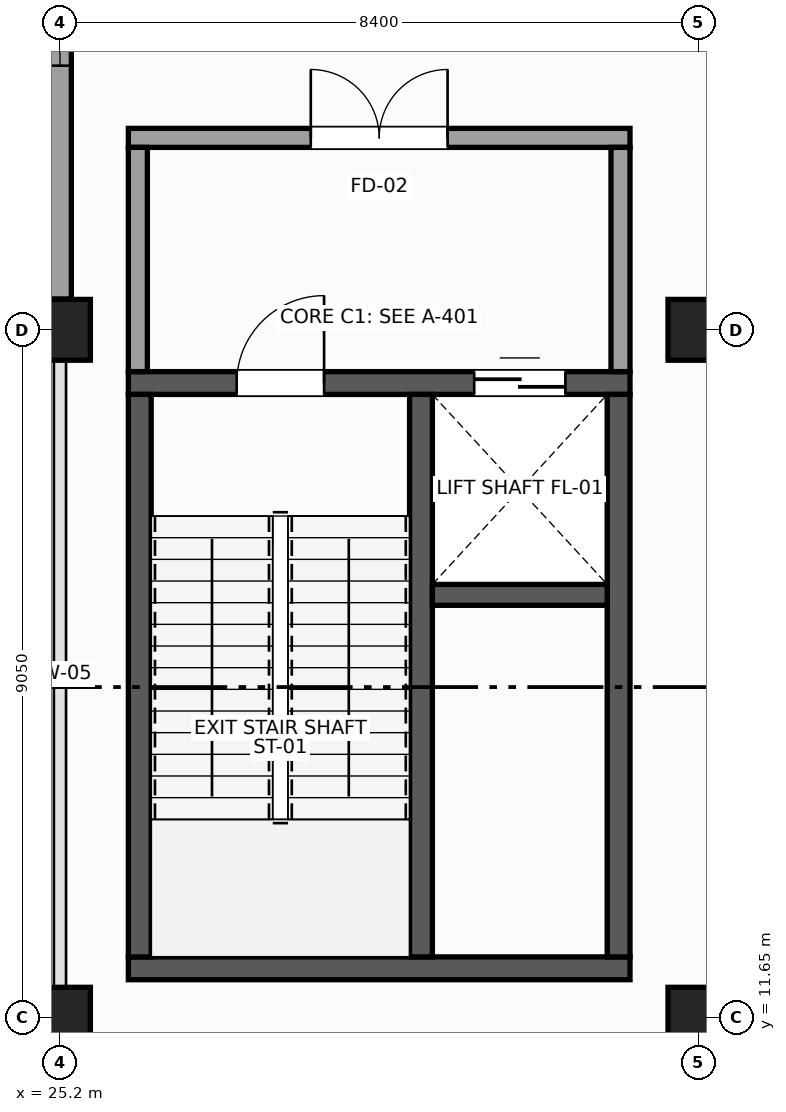
"""IFC4 building model, lengths in metres.
Left out: names, types, materials, properties, quantities, classifications, styles, units other than length and angle.
Written with IfcOpenShell. Run it as: python <this file> out.ifc"""

import sys

from ifc_helpers import new_model, si_unit, direction, frame, frame_2d, origin, origin_2d, place, context, subcontext, project, spatial, rectangle, extrude, element, fill, save


model = new_model("IFC4")
c1 = context("Model", 3, precision=1e-05, world=origin(), true_north=direction((0.0, 1.0)))
c2 = subcontext(c1, "Body", "Model", "MODEL_VIEW")
j1 = project(units=[si_unit("LENGTHUNIT", "METRE"), si_unit("PLANEANGLEUNIT", "RADIAN")], contexts=[c1])
p1 = place(None, origin())
s1 = spatial("IfcSite", under=j1, at=p1, CompositionType="ELEMENT")
p2 = place(p1, origin())
s2 = spatial("IfcBuilding", under=s1, at=p2, CompositionType="ELEMENT")
p3 = place(p2, origin())
s3 = spatial("IfcBuildingStorey", under=s2, at=p3, CompositionType="ELEMENT", Elevation=0.0)
for number, where, z_axis, x_axis in (
    (1, (25.2, 11.65, 0.0), (0.0, 0.0, 1.0), (1.0, 0.0, 0.0)),
    (2, (25.2, 20.7, 0.0), (0.0, 0.0, 1.0), (1.0, 0.0, 0.0)),
    (3, (33.6, 11.65, 0.0), (0.0, 0.0, 1.0), (1.0, 0.0, 0.0)),
    (4, (33.6, 20.7, 0.0), (0.0, 0.0, 1.0), (1.0, 0.0, 0.0)),
):
    element("IfcColumn", number, at=place(p3, frame(where, z_axis=z_axis, x_axis=x_axis)), inside=s3, PredefinedType="COLUMN", context=c2, shape_type="SweptSolid", body=[
        extrude(rectangle(XDim=0.8, YDim=0.8, at=origin_2d()), origin(), (0.0, 0.0, 1.0), 5.4),
    ])
p4 = place(p3, frame((25.2, 29.345, 0.0), z_axis=(0.0, 0.0, 1.0), x_axis=(0.0, -1.0, 0.0)))
e5 = element("IfcWall", 5, at=p4, inside=s3, PredefinedType="STANDARD", context=c2, shape_type="SweptSolid", body=[
    extrude(rectangle(XDim=8.24, YDim=0.3, at=frame_2d((4.12, 0.0))), origin(), (0.0, 0.0, 1.0), 4.24),
])
p5 = place(p4, frame((3.07, 0.0, 0.95)))
e6 = element("IfcOpeningElement", 6, at=p5, cuts=e5, PredefinedType="OPENING", context=c2, shape_type="SweptSolid", body=[
    extrude(rectangle(XDim=2.1, YDim=2.1, at=frame_2d((1.05, 1.05))), frame((0.0, 0.16, 0.0), z_axis=(0.0, -1.0, 0.0), x_axis=(1.0, 0.0, 0.0)), (0.0, 0.0, 1.0), 0.32),
])
p6 = place(p3, frame((26.1, 12.3, 0.0), z_axis=(0.0, 0.0, 1.0), x_axis=(1.0, 0.0, 0.0)))
e7 = element("IfcWall", 7, at=p6, inside=s3, PredefinedType="SHEAR", context=c2, shape_type="SweptSolid", body=[
    extrude(rectangle(XDim=6.6, YDim=0.3, at=frame_2d((3.3, 0.0))), origin(), (0.0, 0.0, 1.0), 5.09),
])
p7 = place(p3, frame((26.1, 20.0, 0.0), z_axis=(0.0, 0.0, 1.0), x_axis=(1.0, 0.0, 0.0)))
e8 = element("IfcWall", 8, at=p7, inside=s3, PredefinedType="SHEAR", context=c2, shape_type="SweptSolid", body=[
    extrude(rectangle(XDim=6.6, YDim=0.3, at=frame_2d((3.3, 0.0))), origin(), (0.0, 0.0, 1.0), 5.09),
])
p8 = place(p7, frame((1.425, 0.0, 0.0)))
e9 = element("IfcOpeningElement", 9, at=p8, cuts=e8, PredefinedType="OPENING", context=c2, shape_type="SweptSolid", body=[
    extrude(rectangle(XDim=1.15, YDim=2.2, at=frame_2d((0.575, 1.1))), frame((0.0, 0.16, 0.0), z_axis=(0.0, -1.0, 0.0), x_axis=(1.0, 0.0, 0.0)), (0.0, 0.0, 1.0), 0.32),
])
p9 = place(p7, frame((4.55, 0.0, 0.0)))
e10 = element("IfcOpeningElement", 10, at=p9, cuts=e8, PredefinedType="OPENING", context=c2, shape_type="SweptSolid", body=[
    extrude(rectangle(XDim=1.2, YDim=2.15, at=frame_2d((0.6, 1.075))), frame((0.0, 0.16, 0.0), z_axis=(0.0, -1.0, 0.0), x_axis=(1.0, 0.0, 0.0)), (0.0, 0.0, 1.0), 0.32),
])
for number, where, z_axis, x_axis in (
    (11, (26.25, 12.45, 0.0), (0.0, 0.0, 1.0), (0.0, 1.0, 0.0)),
    (12, (32.55, 12.45, 0.0), (0.0, 0.0, 1.0), (0.0, 1.0, 0.0)),
    (13, (29.95, 12.45, 0.0), (0.0, 0.0, 1.0), (0.0, 1.0, 0.0)),
):
    element("IfcWall", number, at=place(p3, frame(where, z_axis=z_axis, x_axis=x_axis)), inside=s3, PredefinedType="SHEAR", context=c2, shape_type="SweptSolid", body=[
        extrude(rectangle(XDim=7.4, YDim=0.3, at=frame_2d((3.7, 0.0))), origin(), (0.0, 0.0, 1.0), 5.09),
    ])
p10 = place(p3, frame((30.1, 17.213, 0.0), z_axis=(0.0, 0.0, 1.0), x_axis=(1.0, 0.0, 0.0)))
e14 = element("IfcWall", 14, at=p10, inside=s3, PredefinedType="SHEAR", context=c2, shape_type="SweptSolid", body=[
    extrude(rectangle(XDim=2.3, YDim=0.275, at=frame_2d((1.15, 0.0))), origin(), (0.0, 0.0, 1.0), 5.09),
])
p11 = place(p3, frame((26.1, 23.225, 0.0), z_axis=(0.0, 0.0, 1.0), x_axis=(1.0, 0.0, 0.0)))
e15 = element("IfcWall", 15, at=p11, inside=s3, PredefinedType="PARTITIONING", context=c2, shape_type="SweptSolid", body=[
    extrude(rectangle(XDim=6.6, YDim=0.25, at=frame_2d((3.3, 0.0))), origin(), (0.0, 0.0, 1.0), 5.09),
])
p12 = place(p11, frame((2.4, 0.0, 0.0)))
e16 = element("IfcOpeningElement", 16, at=p12, cuts=e15, PredefinedType="OPENING", context=c2, shape_type="SweptSolid", body=[
    extrude(rectangle(XDim=1.8, YDim=2.25, at=frame_2d((0.9, 1.125))), frame((0.0, 0.135, 0.0), z_axis=(0.0, -1.0, 0.0), x_axis=(1.0, 0.0, 0.0)), (0.0, 0.0, 1.0), 0.27),
])
for number, where, z_axis, x_axis in (
    (17, (26.225, 20.15, 0.0), (0.0, 0.0, 1.0), (0.0, 1.0, 0.0)),
    (18, (32.575, 20.15, 0.0), (0.0, 0.0, 1.0), (0.0, 1.0, 0.0)),
):
    element("IfcWall", number, at=place(p3, frame(where, z_axis=z_axis, x_axis=x_axis)), inside=s3, PredefinedType="PARTITIONING", context=c2, shape_type="SweptSolid", body=[
        extrude(rectangle(XDim=2.95, YDim=0.25, at=frame_2d((1.475, 0.0))), origin(), (0.0, 0.0, 1.0), 4.23),
    ])
p13 = place(p5, origin())
e19 = element("IfcWindow", 19, at=p13, inside=s3, PartitioningType="SINGLE_PANEL", PredefinedType="WINDOW", context=c2, shape_type="SweptSolid", body=[
    extrude(rectangle(XDim=2.1, YDim=2.1, at=frame_2d((1.05, 1.05))), frame((0.0, 0.03, 0.0), z_axis=(0.0, -1.0, 0.0), x_axis=(1.0, 0.0, 0.0)), (0.0, 0.0, 1.0), 0.06),
])
fill(e6, e19)
p14 = place(p8, origin())
e20 = element("IfcDoor", 20, at=p14, inside=s3, OperationType="SINGLE_SWING_RIGHT", PredefinedType="DOOR", context=c2, shape_type="SweptSolid", body=[
    extrude(rectangle(XDim=1.15, YDim=2.2, at=frame_2d((0.575, 1.1))), frame((0.0, 0.025, 0.0), z_axis=(0.0, -1.0, 0.0), x_axis=(1.0, 0.0, 0.0)), (0.0, 0.0, 1.0), 0.05),
])
fill(e9, e20)
p15 = place(p9, origin())
e21 = element("IfcDoor", 21, at=p15, inside=s3, OperationType="DOUBLE_DOOR_SLIDING", PredefinedType="DOOR", context=c2, shape_type="SweptSolid", body=[
    extrude(rectangle(XDim=1.2, YDim=2.15, at=frame_2d((0.6, 1.075))), frame((0.0, 0.025, 0.0), z_axis=(0.0, -1.0, 0.0), x_axis=(1.0, 0.0, 0.0)), (0.0, 0.0, 1.0), 0.05),
])
fill(e10, e21)
p16 = place(p12, origin())
e22 = element("IfcDoor", 22, at=p16, inside=s3, OperationType="DOUBLE_DOOR_SINGLE_SWING", PredefinedType="DOOR", context=c2, shape_type="SweptSolid", body=[
    extrude(rectangle(XDim=1.8, YDim=2.25, at=frame_2d((0.9, 1.125))), frame((0.0, 0.025, 0.0), z_axis=(0.0, -1.0, 0.0), x_axis=(1.0, 0.0, 0.0)), (0.0, 0.0, 1.0), 0.05),
])
fill(e16, e22)
save(model, sys.argv[1])
